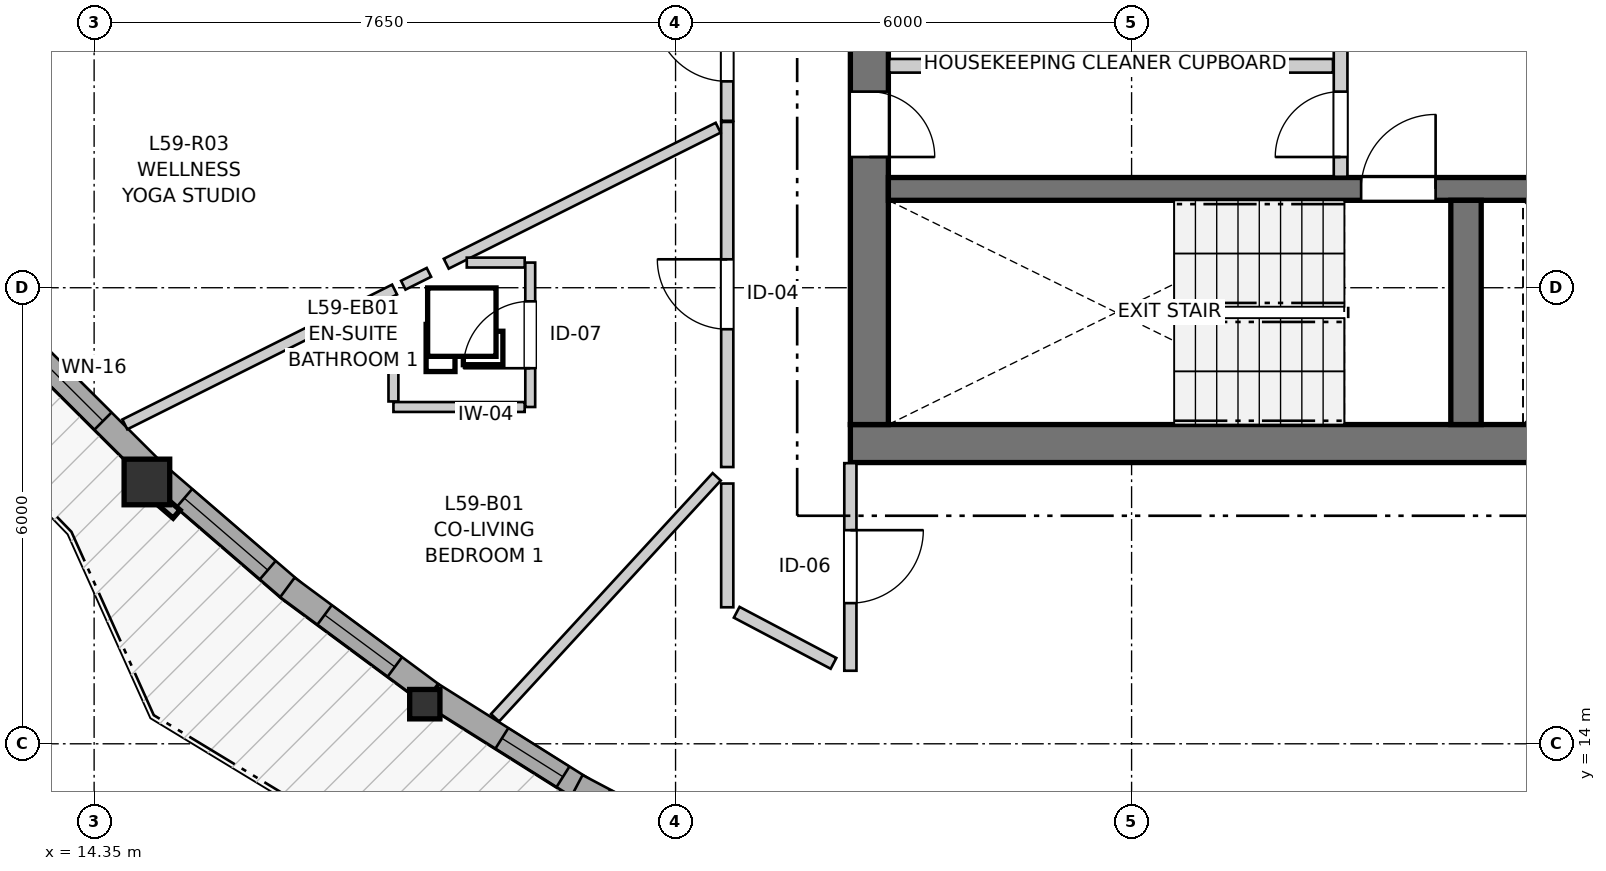
"""IFC4 building model, lengths in metres.
Left out: names, types, materials, properties, quantities, classifications, styles, units other than length and angle.
Written with IfcOpenShell. Run it as: python <this file> out.ifc"""

import sys

from ifc_helpers import new_model, si_unit, direction, frame, frame_2d, origin, origin_2d, place, context, subcontext, project, spatial, rectangle, i_section, extrude, source, transform, mapped, element, fill, save


model = new_model("IFC4")
c1 = context("Model", 3, precision=1e-05, world=origin(), true_north=direction((0.0, 1.0)))
c2 = subcontext(c1, "Body", "Model", "MODEL_VIEW")
j1 = project(units=[si_unit("LENGTHUNIT", "METRE"), si_unit("PLANEANGLEUNIT", "RADIAN")], contexts=[c1])
p1 = place(None, origin())
s1 = spatial("IfcSite", under=j1, at=p1, CompositionType="ELEMENT")
p2 = place(p1, origin())
s2 = spatial("IfcBuilding", under=s1, at=p2, CompositionType="ELEMENT")
p3 = place(p2, frame((0.0, 0.0, 198.8)))
s3 = spatial("IfcBuildingStorey", under=s2, at=p3, CompositionType="ELEMENT", Elevation=198.8)
p4 = place(p3, frame((24.3, 17.95, 0.0), z_axis=(0.0, 0.0, 1.0), x_axis=(1.0, 0.0, 0.0)))
e1 = element("IfcWall", 1, at=p4, inside=s3, PredefinedType="SHEAR", context=c2, shape_type="SweptSolid", body=[
    extrude(rectangle(XDim=12.1, YDim=0.5, at=frame_2d((6.05, 0.0))), origin(), (0.0, 0.0, 1.0), 2.96),
])
p5 = place(p3, frame((24.55, 33.8, 0.0), z_axis=(0.0, 0.0, 1.0), x_axis=(0.0, -1.0, 0.0)))
e2 = element("IfcWall", 2, at=p5, inside=s3, PredefinedType="SHEAR", context=c2, shape_type="SweptSolid", body=[
    extrude(rectangle(XDim=15.6, YDim=0.5, at=frame_2d((7.8, 0.0))), origin(), (0.0, 0.0, 1.0), 2.96),
])
p6 = place(p5, frame((7.05, 0.0, 0.0)))
e3 = element("IfcOpeningElement", 3, at=p6, cuts=e2, PredefinedType="OPENING", context=c2, shape_type="SweptSolid", body=[
    extrude(rectangle(XDim=1.5, YDim=2.15, at=frame_2d((0.75, 1.075))), frame((0.0, 0.26, 0.0), z_axis=(0.0, -1.0, 0.0), x_axis=(1.0, 0.0, 0.0)), (0.0, 0.0, 1.0), 0.52),
])
p7 = place(p5, frame((3.52, 0.0, 0.0)))
e4 = element("IfcOpeningElement", 4, at=p7, cuts=e2, PredefinedType="OPENING", context=c2, shape_type="SweptSolid", body=[
    extrude(rectangle(XDim=0.86, YDim=2.05, at=frame_2d((0.43, 1.025))), frame((0.0, 0.26, 0.0), z_axis=(0.0, -1.0, 0.0), x_axis=(1.0, 0.0, 0.0)), (0.0, 0.0, 1.0), 0.52),
])
p8 = place(p5, frame((11.22, 0.0, 0.0)))
e5 = element("IfcOpeningElement", 5, at=p8, cuts=e2, PredefinedType="OPENING", context=c2, shape_type="SweptSolid", body=[
    extrude(rectangle(XDim=0.86, YDim=2.05, at=frame_2d((0.43, 1.025))), frame((0.0, 0.26, 0.0), z_axis=(0.0, -1.0, 0.0), x_axis=(1.0, 0.0, 0.0)), (0.0, 0.0, 1.0), 0.52),
])
p9 = place(p3, frame((24.8, 21.3, 0.0), z_axis=(0.0, 0.0, 1.0), x_axis=(1.0, 0.0, 0.0)))
e6 = element("IfcWall", 6, at=p9, inside=s3, PredefinedType="SHEAR", context=c2, shape_type="SweptSolid", body=[
    extrude(rectangle(XDim=11.1, YDim=0.3, at=frame_2d((5.55, 0.0))), origin(), (0.0, 0.0, 1.0), 2.96),
])
p10 = place(p9, frame((6.22, 0.0, 0.0)))
e7 = element("IfcOpeningElement", 7, at=p10, cuts=e6, PredefinedType="OPENING", context=c2, shape_type="SweptSolid", body=[
    extrude(rectangle(XDim=0.98, YDim=2.15, at=frame_2d((0.49, 1.075))), frame((0.0, 0.16, 0.0), z_axis=(0.0, -1.0, 0.0), x_axis=(1.0, 0.0, 0.0)), (0.0, 0.0, 1.0), 0.32),
])
p11 = place(p9, frame((9.15, 0.0, 0.0)))
e8 = element("IfcOpeningElement", 8, at=p11, cuts=e6, PredefinedType="OPENING", context=c2, shape_type="SweptSolid", body=[
    extrude(rectangle(XDim=1.15, YDim=2.15, at=frame_2d((0.575, 1.075))), frame((0.0, 0.16, 0.0), z_axis=(0.0, -1.0, 0.0), x_axis=(1.0, 0.0, 0.0)), (0.0, 0.0, 1.0), 0.32),
])
p12 = place(p3, frame((32.4, 18.2, 0.0), z_axis=(0.0, 0.0, 1.0), x_axis=(0.0, 1.0, 0.0)))
e9 = element("IfcWall", 9, at=p12, inside=s3, PredefinedType="SHEAR", context=c2, shape_type="SweptSolid", body=[
    extrude(rectangle(XDim=2.95, YDim=0.4, at=frame_2d((1.475, 0.0))), origin(), (0.0, 0.0, 1.0), 2.96),
])
m1 = source(origin(), c2, "Body", "SweptSolid", [
    extrude(rectangle(XDim=0.6, YDim=0.6, at=origin_2d()), origin(), (0.0, 0.0, 1.0), 2.96),
])
p13 = place(p3, frame((15.044, 17.445, 0.0), z_axis=(0.0, 0.0, 1.0), x_axis=(1.0, 0.0, 0.0)))
e10 = element("IfcColumn", 10, at=p13, inside=s3, PredefinedType="COLUMN", context=c2, shape_type="MappedRepresentation", body=[
    mapped(m1, transform((0.0, 0.0, 0.0), x_axis=(1.0, 0.0, 0.0), y_axis=(0.0, 1.0, 0.0), z_axis=(0.0, 0.0, 1.0), scale=1.0)),
])
m2 = source(origin(), c2, "Body", "SweptSolid", [
    extrude(i_section(OverallWidth=0.398, OverallDepth=0.387, WebThickness=0.019, FlangeThickness=0.03, FilletRadius=0.015, at=origin_2d()), origin(), (0.0, 0.0, 1.0), 2.96),
])
p14 = place(p3, frame((18.701, 14.521, 0.0), z_axis=(0.0, 0.0, 1.0), x_axis=(1.0, 0.0, 0.0)))
e11 = element("IfcColumn", 11, at=p14, inside=s3, PredefinedType="PILASTER", context=c2, shape_type="MappedRepresentation", body=[
    mapped(m2, transform((0.0, 0.0, 0.0), x_axis=(1.0, 0.0, 0.0), y_axis=(0.0, 1.0, 0.0), z_axis=(0.0, 0.0, 1.0), scale=1.0)),
])
p15 = place(p3, frame((13.434, 19.275, 0.0), z_axis=(0.0, 0.0, 1.0), x_axis=(0.708408377073, -0.705802784985, 0.0)))
e12 = element("IfcWall", 12, at=p15, inside=s3, PredefinedType="SOLIDWALL", context=c2, shape_type="SweptSolid", body=[
    extrude(rectangle(XDim=2.343, YDim=0.32, at=frame_2d((1.171, 0.0))), origin(), (0.0, 0.0, 1.0), 2.58),
])
p16 = place(p15, frame((0.308, 0.0, 0.82)))
e13 = element("IfcOpeningElement", 13, at=p16, cuts=e12, PredefinedType="OPENING", context=c2, shape_type="SweptSolid", body=[
    extrude(rectangle(XDim=1.15, YDim=1.2, at=frame_2d((0.575, 0.6))), frame((0.0, 0.17, 0.0), z_axis=(0.0, -1.0, 0.0), x_axis=(1.0, 0.0, 0.0)), (0.0, 0.0, 1.0), 0.34),
])
p17 = place(p3, frame((15.217, 17.507, 0.0), z_axis=(0.0, 0.0, 1.0), x_axis=(0.757473216355, -0.652866239366, 0.0)))
e14 = element("IfcWall", 14, at=p17, inside=s3, PredefinedType="SOLIDWALL", context=c2, shape_type="SweptSolid", body=[
    extrude(rectangle(XDim=2.303, YDim=0.32, at=frame_2d((1.152, 0.0))), origin(), (0.0, 0.0, 1.0), 2.58),
])
p18 = place(p17, frame((0.422, 0.0, 0.82)))
e15 = element("IfcOpeningElement", 15, at=p18, cuts=e14, PredefinedType="OPENING", context=c2, shape_type="SweptSolid", body=[
    extrude(rectangle(XDim=1.45, YDim=1.25, at=frame_2d((0.725, 0.625))), frame((0.0, 0.17, 0.0), z_axis=(0.0, -1.0, 0.0), x_axis=(1.0, 0.0, 0.0)), (0.0, 0.0, 1.0), 0.34),
])
p19 = place(p3, frame((16.893, 16.058, 0.0), z_axis=(0.0, 0.0, 1.0), x_axis=(0.803791161534, -0.594911563713, 0.0)))
e16 = element("IfcWall", 16, at=p19, inside=s3, PredefinedType="SOLIDWALL", context=c2, shape_type="SweptSolid", body=[
    extrude(rectangle(XDim=2.347, YDim=0.32, at=frame_2d((1.173, 0.0))), origin(), (0.0, 0.0, 1.0), 2.58),
])
p20 = place(p19, frame((0.608, 0.0, 0.82)))
e17 = element("IfcOpeningElement", 17, at=p20, cuts=e16, PredefinedType="OPENING", context=c2, shape_type="SweptSolid", body=[
    extrude(rectangle(XDim=1.15, YDim=1.2, at=frame_2d((0.575, 0.6))), frame((0.0, 0.17, 0.0), z_axis=(0.0, -1.0, 0.0), x_axis=(1.0, 0.0, 0.0)), (0.0, 0.0, 1.0), 0.34),
])
p21 = place(p3, frame((18.803, 14.646, 0.0), z_axis=(0.0, 0.0, 1.0), x_axis=(0.846390024768, -0.532563541724, 0.0)))
e18 = element("IfcWall", 18, at=p21, inside=s3, PredefinedType="SOLIDWALL", context=c2, shape_type="SweptSolid", body=[
    extrude(rectangle(XDim=2.334, YDim=0.32, at=frame_2d((1.167, 0.0))), origin(), (0.0, 0.0, 1.0), 2.58),
])
p22 = place(p21, frame((1.078, 0.0, 0.82)))
e19 = element("IfcOpeningElement", 19, at=p22, cuts=e18, PredefinedType="OPENING", context=c2, shape_type="SweptSolid", body=[
    extrude(rectangle(XDim=0.95, YDim=1.35, at=frame_2d((0.475, 0.675))), frame((0.0, 0.17, 0.0), z_axis=(0.0, -1.0, 0.0), x_axis=(1.0, 0.0, 0.0)), (0.0, 0.0, 1.0), 0.34),
])
p23 = place(p3, frame((20.702, 13.448, 0.0), z_axis=(0.0, 0.0, 1.0), x_axis=(0.884374859293, -0.466777364758, 0.0)))
e20 = element("IfcWall", 20, at=p23, inside=s3, PredefinedType="SOLIDWALL", context=c2, shape_type="SweptSolid", body=[
    extrude(rectangle(XDim=2.264, YDim=0.32, at=frame_2d((1.132, 0.0))), origin(), (0.0, 0.0, 1.0), 2.58),
])
p24 = place(p23, frame((0.412, 0.0, 0.82)))
e21 = element("IfcOpeningElement", 21, at=p24, cuts=e20, PredefinedType="OPENING", context=c2, shape_type="SweptSolid", body=[
    extrude(rectangle(XDim=1.45, YDim=1.25, at=frame_2d((0.725, 0.625))), frame((0.0, 0.17, 0.0), z_axis=(0.0, -1.0, 0.0), x_axis=(1.0, 0.0, 0.0)), (0.0, 0.0, 1.0), 0.34),
])
p25 = place(p3, frame((30.75, 21.46, 0.0), z_axis=(0.0, 0.0, 1.0), x_axis=(0.0, 1.0, 0.0)))
e22 = element("IfcWall", 22, at=p25, inside=s3, PredefinedType="PARTITIONING", context=c2, shape_type="SweptSolid", body=[
    extrude(rectangle(XDim=3.11, YDim=0.18, at=frame_2d((1.555, 0.0))), origin(), (0.0, 0.0, 1.0), 2.96),
])
p26 = place(p25, frame((0.26, 0.0, 0.0)))
e23 = element("IfcOpeningElement", 23, at=p26, cuts=e22, PredefinedType="OPENING", context=c2, shape_type="SweptSolid", body=[
    extrude(rectangle(XDim=0.86, YDim=2.05, at=frame_2d((0.43, 1.025))), frame((0.0, 0.1, 0.0), z_axis=(0.0, -1.0, 0.0), x_axis=(1.0, 0.0, 0.0)), (0.0, 0.0, 1.0), 0.2),
])
p27 = place(p3, frame((24.81, 22.92, 0.0), z_axis=(0.0, 0.0, 1.0), x_axis=(1.0, 0.0, 0.0)))
e24 = element("IfcWall", 24, at=p27, inside=s3, PredefinedType="PARTITIONING", context=c2, shape_type="SweptSolid", body=[
    extrude(rectangle(XDim=5.84, YDim=0.18, at=frame_2d((2.92, 0.0))), origin(), (0.0, 0.0, 1.0), 2.96),
])
p28 = place(p3, frame((22.68, 17.641, 0.0), z_axis=(0.0, 0.0, 1.0), x_axis=(0.0, 1.0, 0.0)))
e25 = element("IfcWall", 25, at=p28, inside=s3, PredefinedType="PARTITIONING", context=c2, shape_type="SweptSolid", body=[
    extrude(rectangle(XDim=4.54, YDim=0.16, at=frame_2d((2.27, 0.0))), origin(), (0.0, 0.0, 1.0), 2.96),
])
p29 = place(p28, frame((1.813, 0.0, 0.0)))
e26 = element("IfcOpeningElement", 26, at=p29, cuts=e25, PredefinedType="OPENING", context=c2, shape_type="SweptSolid", body=[
    extrude(rectangle(XDim=0.92, YDim=2.1, at=frame_2d((0.46, 1.05))), frame((0.0, 0.09, 0.0), z_axis=(0.0, -1.0, 0.0), x_axis=(1.0, 0.0, 0.0)), (0.0, 0.0, 1.0), 0.18),
])
p30 = place(p3, frame((24.3, 17.692, 0.0), z_axis=(0.0, 0.0, 1.0), x_axis=(0.0, -1.0, 0.0)))
e27 = element("IfcWall", 27, at=p30, inside=s3, PredefinedType="PARTITIONING", context=c2, shape_type="SweptSolid", body=[
    extrude(rectangle(XDim=2.731, YDim=0.16, at=frame_2d((1.365, 0.0))), origin(), (0.0, 0.0, 1.0), 2.96),
])
p31 = place(p30, frame((0.882, 0.0, 0.0)))
e28 = element("IfcOpeningElement", 28, at=p31, cuts=e27, PredefinedType="OPENING", context=c2, shape_type="SweptSolid", body=[
    extrude(rectangle(XDim=0.96, YDim=2.1, at=frame_2d((0.48, 1.05))), frame((0.0, 0.09, 0.0), z_axis=(0.0, -1.0, 0.0), x_axis=(1.0, 0.0, 0.0)), (0.0, 0.0, 1.0), 0.18),
])
p32 = place(p3, frame((22.68, 22.196, 0.0), z_axis=(0.0, 0.0, 1.0), x_axis=(0.0, 1.0, 0.0)))
e29 = element("IfcWall", 29, at=p32, inside=s3, PredefinedType="PARTITIONING", context=c2, shape_type="SweptSolid", body=[
    extrude(rectangle(XDim=1.954, YDim=0.16, at=frame_2d((0.977, 0.0))), origin(), (0.0, 0.0, 1.0), 2.96),
])
p33 = place(p32, frame((0.519, 0.0, 0.0)))
e30 = element("IfcOpeningElement", 30, at=p33, cuts=e29, PredefinedType="OPENING", context=c2, shape_type="SweptSolid", body=[
    extrude(rectangle(XDim=0.96, YDim=2.1, at=frame_2d((0.48, 1.05))), frame((0.0, 0.09, 0.0), z_axis=(0.0, -1.0, 0.0), x_axis=(1.0, 0.0, 0.0)), (0.0, 0.0, 1.0), 0.18),
])
p34 = place(p3, frame((20.088, 18.431, 0.0), z_axis=(0.0, 0.0, 1.0), x_axis=(0.0, 1.0, 0.0)))
e31 = element("IfcWall", 31, at=p34, inside=s3, PredefinedType="PARTITIONING", context=c2, shape_type="SweptSolid", body=[
    extrude(rectangle(XDim=1.9, YDim=0.13, at=frame_2d((0.95, 0.0))), origin(), (0.0, 0.0, 1.0), 2.96),
])
p35 = place(p34, frame((0.51, 0.0, 0.0)))
e32 = element("IfcOpeningElement", 32, at=p35, cuts=e31, PredefinedType="OPENING", context=c2, shape_type="SweptSolid", body=[
    extrude(rectangle(XDim=0.88, YDim=2.05, at=frame_2d((0.44, 1.025))), frame((0.0, 0.075, 0.0), z_axis=(0.0, -1.0, 0.0), x_axis=(1.0, 0.0, 0.0)), (0.0, 0.0, 1.0), 0.15),
])
p36 = place(p3, frame((19.625, 14.343, 0.0), z_axis=(0.0, 0.0, 1.0), x_axis=(0.677104421975, 0.735886949023, 0.0)))
e33 = element("IfcWall", 33, at=p36, inside=s3, PredefinedType="PARTITIONING", context=c2, shape_type="SweptSolid", body=[
    extrude(rectangle(XDim=4.307, YDim=0.145, at=frame_2d((2.153, 0.0))), origin(), (0.0, 0.0, 1.0), 2.96),
])
p37 = place(p3, frame((18.983, 20.316, 0.0), z_axis=(0.0, 0.0, 1.0), x_axis=(0.894366146285, 0.447335664104, 0.0)))
e34 = element("IfcWall", 34, at=p37, inside=s3, PredefinedType="PARTITIONING", context=c2, shape_type="SweptSolid", body=[
    extrude(rectangle(XDim=4.0, YDim=0.145, at=frame_2d((2.0, 0.0))), origin(), (0.0, 0.0, 1.0), 2.96),
])
p38 = place(p3, frame((14.754, 18.202, 0.0), z_axis=(0.0, 0.0, 1.0), x_axis=(0.894464106055, 0.44713975777, 0.0)))
e35 = element("IfcWall", 35, at=p38, inside=s3, PredefinedType="PARTITIONING", context=c2, shape_type="SweptSolid", body=[
    extrude(rectangle(XDim=3.968, YDim=0.145, at=frame_2d((1.984, 0.0))), origin(), (0.0, 0.0, 1.0), 2.96),
])
p39 = place(p3, frame((22.68, 15.796, 0.0), z_axis=(0.0, 0.0, 1.0), x_axis=(0.0, 1.0, 0.0)))
e36 = element("IfcWall", 36, at=p39, inside=s3, PredefinedType="PARTITIONING", context=c2, shape_type="SweptSolid", body=[
    extrude(rectangle(XDim=1.628, YDim=0.16, at=frame_2d((0.814, 0.0))), origin(), (0.0, 0.0, 1.0), 2.96),
])
p40 = place(p3, frame((18.288, 18.431, 0.0), z_axis=(0.0, 0.0, 1.0), x_axis=(1.0, 0.0, 0.0)))
e37 = element("IfcWall", 37, at=p40, inside=s3, PredefinedType="PARTITIONING", context=c2, shape_type="SweptSolid", body=[
    extrude(rectangle(XDim=1.727, YDim=0.13, at=frame_2d((0.863, 0.0))), origin(), (0.0, 0.0, 1.0), 2.96),
])
p41 = place(p3, frame((22.804, 15.73, 0.0), z_axis=(0.0, 0.0, 1.0), x_axis=(0.884376976103, -0.466773354143, 0.0)))
e38 = element("IfcWall", 38, at=p41, inside=s3, PredefinedType="PARTITIONING", context=c2, shape_type="SweptSolid", body=[
    extrude(rectangle(XDim=1.44, YDim=0.16, at=frame_2d((0.72, 0.0))), origin(), (0.0, 0.0, 1.0), 2.96),
])
p42 = place(p3, frame((18.288, 18.504, 0.0), z_axis=(0.0, 0.0, 1.0), x_axis=(0.0, 1.0, 0.0)))
e39 = element("IfcWall", 39, at=p42, inside=s3, PredefinedType="PARTITIONING", context=c2, shape_type="SweptSolid", body=[
    extrude(rectangle(XDim=1.344, YDim=0.13, at=frame_2d((0.672, 0.0))), origin(), (0.0, 0.0, 1.0), 2.96),
])
p43 = place(p3, frame((19.253, 20.331, 0.0), z_axis=(0.0, 0.0, 1.0), x_axis=(1.0, 0.0, 0.0)))
e40 = element("IfcWall", 40, at=p43, inside=s3, PredefinedType="PARTITIONING", context=c2, shape_type="SweptSolid", body=[
    extrude(rectangle(XDim=0.762, YDim=0.13, at=frame_2d((0.381, 0.0))), origin(), (0.0, 0.0, 1.0), 2.96),
])
p44 = place(p3, frame((18.417, 20.033, 0.0), z_axis=(0.0, 0.0, 1.0), x_axis=(0.894427191, 0.4472135955, 0.0)))
e41 = element("IfcWall", 41, at=p44, inside=s3, PredefinedType="PARTITIONING", context=c2, shape_type="SweptSolid", body=[
    extrude(rectangle(XDim=0.377, YDim=0.13, at=frame_2d((0.188, 0.0))), origin(), (0.0, 0.0, 1.0), 2.96),
])
m3 = source(origin(), c2, "Body", "SweptSolid", [
    extrude(rectangle(XDim=1.15, YDim=1.2, at=frame_2d((0.575, 0.6))), frame((0.0, 0.03, 0.0), z_axis=(0.0, -1.0, 0.0), x_axis=(1.0, 0.0, 0.0)), (0.0, 0.0, 1.0), 0.06),
])
p45 = place(p16, origin())
e42 = element("IfcWindow", 42, at=p45, inside=s3, PartitioningType="SINGLE_PANEL", PredefinedType="WINDOW", context=c2, shape_type="MappedRepresentation", body=[
    mapped(m3, transform((0.0, 0.0, 0.0), x_axis=(1.0, 0.0, 0.0), y_axis=(0.0, 1.0, 0.0), z_axis=(0.0, 0.0, 1.0), scale=1.0)),
])
fill(e13, e42)
m4 = source(origin(), c2, "Body", "SweptSolid", [
    extrude(rectangle(XDim=1.45, YDim=1.25, at=frame_2d((0.725, 0.625))), frame((0.0, 0.03, 0.0), z_axis=(0.0, -1.0, 0.0), x_axis=(1.0, 0.0, 0.0)), (0.0, 0.0, 1.0), 0.06),
])
p46 = place(p18, origin())
e43 = element("IfcWindow", 43, at=p46, inside=s3, PartitioningType="SINGLE_PANEL", PredefinedType="WINDOW", context=c2, shape_type="MappedRepresentation", body=[
    mapped(m4, transform((0.0, 0.0, 0.0), x_axis=(1.0, 0.0, 0.0), y_axis=(0.0, 1.0, 0.0), z_axis=(0.0, 0.0, 1.0), scale=1.0)),
])
fill(e15, e43)
p47 = place(p20, origin())
e44 = element("IfcWindow", 44, at=p47, inside=s3, PartitioningType="SINGLE_PANEL", PredefinedType="WINDOW", context=c2, shape_type="MappedRepresentation", body=[
    mapped(m3, transform((0.0, 0.0, 0.0), x_axis=(1.0, 0.0, 0.0), y_axis=(0.0, 1.0, 0.0), z_axis=(0.0, 0.0, 1.0), scale=1.0)),
])
fill(e17, e44)
m5 = source(origin(), c2, "Body", "SweptSolid", [
    extrude(rectangle(XDim=0.95, YDim=1.35, at=frame_2d((0.475, 0.675))), frame((0.0, 0.03, 0.0), z_axis=(0.0, -1.0, 0.0), x_axis=(1.0, 0.0, 0.0)), (0.0, 0.0, 1.0), 0.06),
])
p48 = place(p22, origin())
e45 = element("IfcWindow", 45, at=p48, inside=s3, PartitioningType="SINGLE_PANEL", PredefinedType="WINDOW", context=c2, shape_type="MappedRepresentation", body=[
    mapped(m5, transform((0.0, 0.0, 0.0), x_axis=(1.0, 0.0, 0.0), y_axis=(0.0, 1.0, 0.0), z_axis=(0.0, 0.0, 1.0), scale=1.0)),
])
fill(e19, e45)
m6 = source(origin(), c2, "Body", "SweptSolid", [
    extrude(rectangle(XDim=0.98, YDim=2.15, at=frame_2d((0.49, 1.075))), frame((0.0, 0.025, 0.0), z_axis=(0.0, -1.0, 0.0), x_axis=(1.0, 0.0, 0.0)), (0.0, 0.0, 1.0), 0.05),
])
p49 = place(p10, origin())
e46 = element("IfcDoor", 46, at=p49, inside=s3, OperationType="SINGLE_SWING_RIGHT", PredefinedType="DOOR", context=c2, shape_type="MappedRepresentation", body=[
    mapped(m6, transform((0.0, 0.0, 0.0), x_axis=(1.0, 0.0, 0.0), y_axis=(0.0, 1.0, 0.0), z_axis=(0.0, 0.0, 1.0), scale=1.0)),
])
fill(e7, e46)
m7 = source(origin(), c2, "Body", "SweptSolid", [
    extrude(rectangle(XDim=0.86, YDim=2.05, at=frame_2d((0.43, 1.025))), frame((0.0, 0.025, 0.0), z_axis=(0.0, -1.0, 0.0), x_axis=(1.0, 0.0, 0.0)), (0.0, 0.0, 1.0), 0.05),
])
p50 = place(p8, origin())
e47 = element("IfcDoor", 47, at=p50, inside=s3, OperationType="SINGLE_SWING_RIGHT", PredefinedType="DOOR", context=c2, shape_type="MappedRepresentation", body=[
    mapped(m7, transform((0.0, 0.0, 0.0), x_axis=(1.0, 0.0, 0.0), y_axis=(0.0, 1.0, 0.0), z_axis=(0.0, 0.0, 1.0), scale=1.0)),
])
fill(e5, e47)
p51 = place(p26, origin())
e48 = element("IfcDoor", 48, at=p51, inside=s3, OperationType="SINGLE_SWING_LEFT", PredefinedType="DOOR", context=c2, shape_type="MappedRepresentation", body=[
    mapped(m7, transform((0.0, 0.0, 0.0), x_axis=(1.0, 0.0, 0.0), y_axis=(0.0, 1.0, 0.0), z_axis=(0.0, 0.0, 1.0), scale=1.0)),
])
fill(e23, e48)
m8 = source(origin(), c2, "Body", "SweptSolid", [
    extrude(rectangle(XDim=0.92, YDim=2.1, at=frame_2d((0.46, 1.05))), frame((0.0, 0.025, 0.0), z_axis=(0.0, -1.0, 0.0), x_axis=(1.0, 0.0, 0.0)), (0.0, 0.0, 1.0), 0.05),
])
p52 = place(p29, origin())
e49 = element("IfcDoor", 49, at=p52, inside=s3, OperationType="SINGLE_SWING_RIGHT", PredefinedType="DOOR", context=c2, shape_type="MappedRepresentation", body=[
    mapped(m8, transform((0.0, 0.0, 0.0), x_axis=(1.0, 0.0, 0.0), y_axis=(0.0, 1.0, 0.0), z_axis=(0.0, 0.0, 1.0), scale=1.0)),
])
fill(e26, e49)
m9 = source(origin(), c2, "Body", "SweptSolid", [
    extrude(rectangle(XDim=0.96, YDim=2.1, at=frame_2d((0.48, 1.05))), frame((0.0, 0.025, 0.0), z_axis=(0.0, -1.0, 0.0), x_axis=(1.0, 0.0, 0.0)), (0.0, 0.0, 1.0), 0.05),
])
p53 = place(p31, origin())
e50 = element("IfcDoor", 50, at=p53, inside=s3, OperationType="SINGLE_SWING_LEFT", PredefinedType="DOOR", context=c2, shape_type="MappedRepresentation", body=[
    mapped(m9, transform((0.0, 0.0, 0.0), x_axis=(1.0, 0.0, 0.0), y_axis=(0.0, 1.0, 0.0), z_axis=(0.0, 0.0, 1.0), scale=1.0)),
])
fill(e28, e50)
p54 = place(p33, origin())
e51 = element("IfcDoor", 51, at=p54, inside=s3, OperationType="SINGLE_SWING_RIGHT", PredefinedType="DOOR", context=c2, shape_type="MappedRepresentation", body=[
    mapped(m9, transform((0.0, 0.0, 0.0), x_axis=(1.0, 0.0, 0.0), y_axis=(0.0, 1.0, 0.0), z_axis=(0.0, 0.0, 1.0), scale=1.0)),
])
fill(e30, e51)
m10 = source(origin(), c2, "Body", "SweptSolid", [
    extrude(rectangle(XDim=0.88, YDim=2.05, at=frame_2d((0.44, 1.025))), frame((0.0, 0.025, 0.0), z_axis=(0.0, -1.0, 0.0), x_axis=(1.0, 0.0, 0.0)), (0.0, 0.0, 1.0), 0.05),
])
p55 = place(p35, origin())
e52 = element("IfcDoor", 52, at=p55, inside=s3, OperationType="SINGLE_SWING_LEFT", PredefinedType="DOOR", context=c2, shape_type="MappedRepresentation", body=[
    mapped(m10, transform((0.0, 0.0, 0.0), x_axis=(1.0, 0.0, 0.0), y_axis=(0.0, 1.0, 0.0), z_axis=(0.0, 0.0, 1.0), scale=1.0)),
])
fill(e32, e52)
save(model, sys.argv[1])
